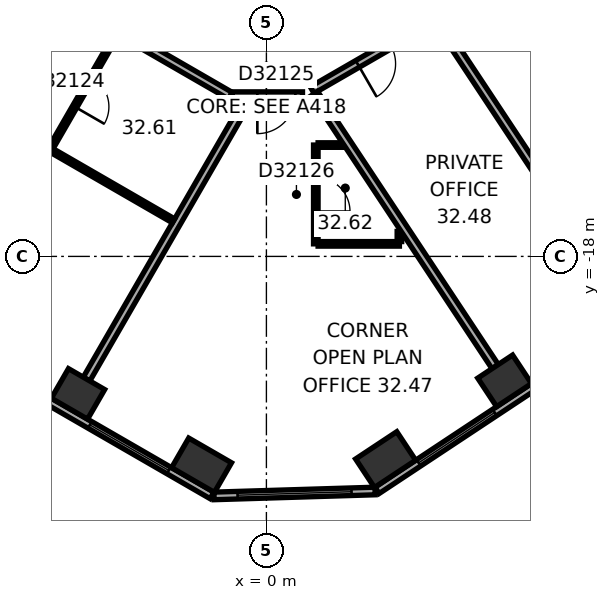
"""IFC4 building model, lengths in metres.
Left out: names, types, materials, properties, quantities, classifications, styles, units other than length and angle.
Written with IfcOpenShell. Run it as: python <this file> out.ifc"""

import sys

from ifc_helpers import new_model, si_unit, direction, frame, frame_2d, origin, origin_2d, place, context, subcontext, project, spatial, rectangle, extrude, element, fill, save


model = new_model("IFC4")
c1 = context("Model", 3, precision=1e-05, world=origin(), true_north=direction((0.0, 1.0)))
c2 = subcontext(c1, "Body", "Model", "MODEL_VIEW")
j1 = project(units=[si_unit("LENGTHUNIT", "METRE"), si_unit("PLANEANGLEUNIT", "RADIAN")], contexts=[c1])
p1 = place(None, origin())
s1 = spatial("IfcSite", under=j1, at=p1, CompositionType="ELEMENT")
p2 = place(p1, origin())
s2 = spatial("IfcBuilding", under=s1, at=p2, CompositionType="ELEMENT")
p3 = place(p2, frame((0.0, 0.0, 131.8)))
s3 = spatial("IfcBuildingStorey", under=s2, at=p3, CompositionType="ELEMENT", Elevation=131.8)
p4 = place(p3, frame((-4.958, -21.617, 0.0), z_axis=(0.0, 0.0, 1.0), x_axis=(0.866025403784, -0.5, 0.0)))
e1 = element("IfcColumn", 1, at=p4, inside=s3, PredefinedType="COLUMN", context=c2, shape_type="SweptSolid", body=[
    extrude(rectangle(XDim=1.1, YDim=0.9, at=origin_2d()), origin(), (0.0, 0.0, 1.0), 3.7),
])
for number, where, z_axis, x_axis in (
    (2, (-1.706, -23.494, 0.0), (0.0, 0.0, 1.0), (0.866, -0.5, 0.0)),
    (3, (3.137, -23.346, 0.0), (0.0, 0.0, 1.0), (0.834, 0.552, 0.0)),
):
    element("IfcColumn", number, at=place(p3, frame(where, z_axis=z_axis, x_axis=x_axis)), inside=s3, PredefinedType="COLUMN", context=c2, shape_type="SweptSolid", body=[
        extrude(rectangle(XDim=1.3, YDim=0.9, at=origin_2d()), origin(), (0.0, 0.0, 1.0), 3.7),
    ])
p5 = place(p3, frame((6.268, -21.274, 0.0), z_axis=(0.0, 0.0, 1.0), x_axis=(0.833885822067, 0.551936985312, 0.0)))
e4 = element("IfcColumn", 4, at=p5, inside=s3, PredefinedType="COLUMN", context=c2, shape_type="SweptSolid", body=[
    extrude(rectangle(XDim=1.1, YDim=0.9, at=origin_2d()), origin(), (0.0, 0.0, 1.0), 3.7),
])
p6 = place(p3, frame((-18.789, -14.267, 0.0), z_axis=(0.0, 0.0, 1.0), x_axis=(0.866023315909, -0.500003616288, 0.0)))
e5 = element("IfcWall", 5, at=p6, inside=s3, PredefinedType="STANDARD", context=c2, shape_type="SweptSolid", body=[
    extrude(rectangle(XDim=20.044, YDim=0.2, at=frame_2d((10.022, 0.0))), origin(), (0.0, 0.0, 1.0), 3.7),
])
p7 = place(p6, frame((1.314, 0.0, 0.9)))
e6 = element("IfcOpeningElement", 6, at=p7, cuts=e5, PredefinedType="OPENING", context=c2, shape_type="SweptSolid", body=[
    extrude(rectangle(XDim=2.4, YDim=2.0, at=frame_2d((1.2, 1.0))), frame((0.0, 0.11, 0.0), z_axis=(0.0, -1.0, 0.0), x_axis=(1.0, 0.0, 0.0)), (0.0, 0.0, 1.0), 0.22),
])
p8 = place(p6, frame((5.069, 0.0, 0.9)))
e7 = element("IfcOpeningElement", 7, at=p8, cuts=e5, PredefinedType="OPENING", context=c2, shape_type="SweptSolid", body=[
    extrude(rectangle(XDim=2.4, YDim=2.0, at=frame_2d((1.2, 1.0))), frame((0.0, 0.11, 0.0), z_axis=(0.0, -1.0, 0.0), x_axis=(1.0, 0.0, 0.0)), (0.0, 0.0, 1.0), 0.22),
])
p9 = place(p6, frame((8.823, 0.0, 0.9)))
e8 = element("IfcOpeningElement", 8, at=p9, cuts=e5, PredefinedType="OPENING", context=c2, shape_type="SweptSolid", body=[
    extrude(rectangle(XDim=2.4, YDim=2.0, at=frame_2d((1.2, 1.0))), frame((0.0, 0.11, 0.0), z_axis=(0.0, -1.0, 0.0), x_axis=(1.0, 0.0, 0.0)), (0.0, 0.0, 1.0), 0.22),
])
p10 = place(p6, frame((12.577, 0.0, 0.9)))
e9 = element("IfcOpeningElement", 9, at=p10, cuts=e5, PredefinedType="OPENING", context=c2, shape_type="SweptSolid", body=[
    extrude(rectangle(XDim=2.4, YDim=2.0, at=frame_2d((1.2, 1.0))), frame((0.0, 0.11, 0.0), z_axis=(0.0, -1.0, 0.0), x_axis=(1.0, 0.0, 0.0)), (0.0, 0.0, 1.0), 0.22),
])
p11 = place(p6, frame((16.331, 0.0, 0.9)))
e10 = element("IfcOpeningElement", 10, at=p11, cuts=e5, PredefinedType="OPENING", context=c2, shape_type="SweptSolid", body=[
    extrude(rectangle(XDim=2.4, YDim=2.0, at=frame_2d((1.2, 1.0))), frame((0.0, 0.11, 0.0), z_axis=(0.0, -1.0, 0.0), x_axis=(1.0, 0.0, 0.0)), (0.0, 0.0, 1.0), 0.22),
])
p12 = place(p3, frame((-1.378, -24.302, 0.0), z_axis=(0.0, 0.0, 1.0), x_axis=(0.999533857267, 0.030529791629, 0.0)))
e11 = element("IfcWall", 11, at=p12, inside=s3, PredefinedType="STANDARD", context=c2, shape_type="SweptSolid", body=[
    extrude(rectangle(XDim=4.238, YDim=0.2, at=frame_2d((2.119, 0.0))), origin(), (0.0, 0.0, 1.0), 3.7),
])
p13 = place(p12, frame((0.619, 0.0, 0.9)))
e12 = element("IfcOpeningElement", 12, at=p13, cuts=e11, PredefinedType="OPENING", context=c2, shape_type="SweptSolid", body=[
    extrude(rectangle(XDim=3.0, YDim=2.0, at=frame_2d((1.5, 1.0))), frame((0.0, 0.11, 0.0), z_axis=(0.0, -1.0, 0.0), x_axis=(1.0, 0.0, 0.0)), (0.0, 0.0, 1.0), 0.22),
])
p14 = place(p3, frame((2.911, -24.156, 0.0), z_axis=(0.0, 0.0, 1.0), x_axis=(0.833882163564, 0.551942512668, 0.0)))
e13 = element("IfcWall", 13, at=p14, inside=s3, PredefinedType="STANDARD", context=c2, shape_type="SweptSolid", body=[
    extrude(rectangle(XDim=20.044, YDim=0.2, at=frame_2d((10.022, 0.0))), origin(), (0.0, 0.0, 1.0), 3.7),
])
p15 = place(p14, frame((1.313, 0.0, 0.9)))
e14 = element("IfcOpeningElement", 14, at=p15, cuts=e13, PredefinedType="OPENING", context=c2, shape_type="SweptSolid", body=[
    extrude(rectangle(XDim=2.4, YDim=2.0, at=frame_2d((1.2, 1.0))), frame((0.0, 0.11, 0.0), z_axis=(0.0, -1.0, 0.0), x_axis=(1.0, 0.0, 0.0)), (0.0, 0.0, 1.0), 0.22),
])
p16 = place(p14, frame((5.067, 0.0, 0.9)))
e15 = element("IfcOpeningElement", 15, at=p16, cuts=e13, PredefinedType="OPENING", context=c2, shape_type="SweptSolid", body=[
    extrude(rectangle(XDim=2.4, YDim=2.0, at=frame_2d((1.2, 1.0))), frame((0.0, 0.11, 0.0), z_axis=(0.0, -1.0, 0.0), x_axis=(1.0, 0.0, 0.0)), (0.0, 0.0, 1.0), 0.22),
])
p17 = place(p14, frame((8.821, 0.0, 0.9)))
e16 = element("IfcOpeningElement", 16, at=p17, cuts=e13, PredefinedType="OPENING", context=c2, shape_type="SweptSolid", body=[
    extrude(rectangle(XDim=2.4, YDim=2.0, at=frame_2d((1.2, 1.0))), frame((0.0, 0.11, 0.0), z_axis=(0.0, -1.0, 0.0), x_axis=(1.0, 0.0, 0.0)), (0.0, 0.0, 1.0), 0.22),
])
p18 = place(p14, frame((12.575, 0.0, 0.9)))
e17 = element("IfcOpeningElement", 17, at=p18, cuts=e13, PredefinedType="OPENING", context=c2, shape_type="SweptSolid", body=[
    extrude(rectangle(XDim=2.4, YDim=2.0, at=frame_2d((1.2, 1.0))), frame((0.0, 0.11, 0.0), z_axis=(0.0, -1.0, 0.0), x_axis=(1.0, 0.0, 0.0)), (0.0, 0.0, 1.0), 0.22),
])
p19 = place(p14, frame((16.329, 0.0, 0.9)))
e18 = element("IfcOpeningElement", 18, at=p19, cuts=e13, PredefinedType="OPENING", context=c2, shape_type="SweptSolid", body=[
    extrude(rectangle(XDim=2.4, YDim=2.0, at=frame_2d((1.2, 1.0))), frame((0.0, 0.11, 0.0), z_axis=(0.0, -1.0, 0.0), x_axis=(1.0, 0.0, 0.0)), (0.0, 0.0, 1.0), 0.22),
])
p20 = place(p3, frame((-11.415, -7.728, 0.0), z_axis=(0.0, 0.0, 1.0), x_axis=(0.866022749921, -0.500004596598, 0.0)))
e19 = element("IfcWall", 19, at=p20, inside=s3, PredefinedType="PARTITIONING", context=c2, shape_type="SweptSolid", body=[
    extrude(rectangle(XDim=12.084, YDim=0.2, at=frame_2d((6.042, 0.0))), origin(), (0.0, 0.0, 1.0), 3.42),
])
p21 = place(p20, frame((5.58, 0.0, 0.0)))
e20 = element("IfcOpeningElement", 20, at=p21, cuts=e19, PredefinedType="OPENING", context=c2, shape_type="SweptSolid", body=[
    extrude(rectangle(XDim=1.0, YDim=2.1, at=frame_2d((0.5, 1.05))), frame((0.0, 0.11, 0.0), z_axis=(0.0, -1.0, 0.0), x_axis=(1.0, 0.0, 0.0)), (0.0, 0.0, 1.0), 0.22),
])
p22 = place(p3, frame((-5.695, -15.188, 0.0), z_axis=(0.0, 0.0, 1.0), x_axis=(0.500010275428, 0.866019471182, 0.0)))
e21 = element("IfcWall", 21, at=p22, inside=s3, PredefinedType="PARTITIONING", context=c2, shape_type="SweptSolid", body=[
    extrude(rectangle(XDim=3.5, YDim=0.12, at=frame_2d((1.75, 0.0))), origin(), (0.0, 0.0, 1.0), 3.42),
])
p23 = place(p22, frame((1.3, 0.0, 0.0)))
e22 = element("IfcOpeningElement", 22, at=p23, cuts=e21, PredefinedType="OPENING", context=c2, shape_type="SweptSolid", body=[
    extrude(rectangle(XDim=0.9, YDim=2.1, at=frame_2d((0.45, 1.05))), frame((0.0, 0.07, 0.0), z_axis=(0.0, -1.0, 0.0), x_axis=(1.0, 0.0, 0.0)), (0.0, 0.0, 1.0), 0.14),
])
p24 = place(p3, frame((-4.732, -21.228, 0.0), z_axis=(0.0, 0.0, 1.0), x_axis=(0.500000843414, 0.866024916838, 0.0)))
e23 = element("IfcWall", 23, at=p24, inside=s3, PredefinedType="PARTITIONING", context=c2, shape_type="SweptSolid", body=[
    extrude(rectangle(XDim=8.452, YDim=0.2, at=frame_2d((4.226, 0.0))), origin(), (0.0, 0.0, 1.0), 3.42),
])
p25 = place(p3, frame((-2.444, -17.064, 0.0), z_axis=(0.0, 0.0, 1.0), x_axis=(-0.86602156466, 0.500006649499, 0.0)))
e24 = element("IfcWall", 24, at=p25, inside=s3, PredefinedType="PARTITIONING", context=c2, shape_type="SweptSolid", body=[
    extrude(rectangle(XDim=3.693, YDim=0.12, at=frame_2d((1.847, 0.0))), origin(), (0.0, 0.0, 1.0), 3.42),
])
p26 = place(p3, frame((-0.91, -13.77, 0.0), z_axis=(0.0, 0.0, 1.0), x_axis=(1.0, 0.0, 0.0)))
e25 = element("IfcWall", 25, at=p26, inside=s3, PredefinedType="PARTITIONING", context=c2, shape_type="SweptSolid", body=[
    extrude(rectangle(XDim=1.86, YDim=0.2, at=frame_2d((0.93, 0.0))), origin(), (0.0, 0.0, 1.0), 3.42),
])
p27 = place(p26, frame((0.672, 0.0, 0.0)))
e26 = element("IfcOpeningElement", 26, at=p27, cuts=e25, PredefinedType="OPENING", context=c2, shape_type="SweptSolid", body=[
    extrude(rectangle(XDim=1.0, YDim=2.1, at=frame_2d((0.5, 1.05))), frame((0.0, 0.11, 0.0), z_axis=(0.0, -1.0, 0.0), x_axis=(1.0, 0.0, 0.0)), (0.0, 0.0, 1.0), 0.22),
])
p28 = place(p3, frame((1.204, -13.623, 0.0), z_axis=(0.0, 0.0, 1.0), x_axis=(0.866031867142, 0.49998880497, 0.0)))
e27 = element("IfcWall", 27, at=p28, inside=s3, PredefinedType="PARTITIONING", context=c2, shape_type="SweptSolid", body=[
    extrude(rectangle(XDim=6.268, YDim=0.2, at=frame_2d((3.134, 0.0))), origin(), (0.0, 0.0, 1.0), 3.42),
])
p29 = place(p28, frame((1.381, 0.0, 0.0)))
e28 = element("IfcOpeningElement", 28, at=p29, cuts=e27, PredefinedType="OPENING", context=c2, shape_type="SweptSolid", body=[
    extrude(rectangle(XDim=1.0, YDim=2.1, at=frame_2d((0.5, 1.05))), frame((0.0, 0.11, 0.0), z_axis=(0.0, -1.0, 0.0), x_axis=(1.0, 0.0, 0.0)), (0.0, 0.0, 1.0), 0.22),
])
p30 = place(p28, frame((4.515, 0.0, 0.0)))
e29 = element("IfcOpeningElement", 29, at=p30, cuts=e27, PredefinedType="OPENING", context=c2, shape_type="SweptSolid", body=[
    extrude(rectangle(XDim=1.0, YDim=2.1, at=frame_2d((0.5, 1.05))), frame((0.0, 0.11, 0.0), z_axis=(0.0, -1.0, 0.0), x_axis=(1.0, 0.0, 0.0)), (0.0, 0.0, 1.0), 0.22),
])
p31 = place(p3, frame((1.3, -17.67, 0.0), z_axis=(0.0, 0.0, 1.0), x_axis=(0.0, 1.0, 0.0)))
e30 = element("IfcWall", 30, at=p31, inside=s3, PredefinedType="PARTITIONING", context=c2, shape_type="SweptSolid", body=[
    extrude(rectangle(XDim=2.6, YDim=0.12, at=frame_2d((1.3, 0.0))), origin(), (0.0, 0.0, 1.0), 3.42),
])
p32 = place(p31, frame((0.85, 0.0, 0.0)))
e31 = element("IfcOpeningElement", 31, at=p32, cuts=e30, PredefinedType="OPENING", context=c2, shape_type="SweptSolid", body=[
    extrude(rectangle(XDim=0.9, YDim=2.1, at=frame_2d((0.45, 1.05))), frame((0.0, 0.07, 0.0), z_axis=(0.0, -1.0, 0.0), x_axis=(1.0, 0.0, 0.0)), (0.0, 0.0, 1.0), 0.14),
])
p33 = place(p3, frame((1.36, -15.07, 0.0), z_axis=(0.0, 0.0, 1.0), x_axis=(1.0, 0.0, 0.0)))
e32 = element("IfcWall", 32, at=p33, inside=s3, PredefinedType="PARTITIONING", context=c2, shape_type="SweptSolid", body=[
    extrude(rectangle(XDim=0.651, YDim=0.12, at=frame_2d((0.325, 0.0))), origin(), (0.0, 0.0, 1.0), 3.42),
])
p34 = place(p3, frame((3.5, -17.67, 0.0), z_axis=(0.0, 0.0, 1.0), x_axis=(-1.0, 0.0, 0.0)))
e33 = element("IfcWall", 33, at=p34, inside=s3, PredefinedType="PARTITIONING", context=c2, shape_type="SweptSolid", body=[
    extrude(rectangle(XDim=2.14, YDim=0.12, at=frame_2d((1.07, 0.0))), origin(), (0.0, 0.0, 1.0), 3.42),
])
p35 = place(p3, frame((3.5, -17.343, 0.0), z_axis=(0.0, 0.0, 1.0), x_axis=(0.0, -1.0, 0.0)))
e34 = element("IfcWall", 34, at=p35, inside=s3, PredefinedType="PARTITIONING", context=c2, shape_type="SweptSolid", body=[
    extrude(rectangle(XDim=0.267, YDim=0.12, at=frame_2d((0.134, 0.0))), origin(), (0.0, 0.0, 1.0), 3.42),
])
p36 = place(p3, frame((6.02, -20.899, 0.0), z_axis=(0.0, 0.0, 1.0), x_axis=(-0.551943990108, 0.833881185651, 0.0)))
e35 = element("IfcWall", 35, at=p36, inside=s3, PredefinedType="PARTITIONING", context=c2, shape_type="SweptSolid", body=[
    extrude(rectangle(XDim=8.615, YDim=0.2, at=frame_2d((4.308, 0.0))), origin(), (0.0, 0.0, 1.0), 3.42),
])
p37 = place(p3, frame((9.15, -18.827, 0.0), z_axis=(0.0, 0.0, 1.0), x_axis=(-0.551942527453, 0.833882153777, 0.0)))
e36 = element("IfcWall", 36, at=p37, inside=s3, PredefinedType="PARTITIONING", context=c2, shape_type="SweptSolid", body=[
    extrude(rectangle(XDim=8.386, YDim=0.2, at=frame_2d((4.193, 0.0))), origin(), (0.0, 0.0, 1.0), 2.87),
])
p38 = place(p11, origin())
e37 = element("IfcWindow", 37, at=p38, inside=s3, PartitioningType="SINGLE_PANEL", PredefinedType="WINDOW", context=c2, shape_type="SweptSolid", body=[
    extrude(rectangle(XDim=2.4, YDim=2.0, at=frame_2d((1.2, 1.0))), frame((0.0, 0.03, 0.0), z_axis=(0.0, -1.0, 0.0), x_axis=(1.0, 0.0, 0.0)), (0.0, 0.0, 1.0), 0.06),
])
fill(e10, e37)
p39 = place(p13, origin())
e38 = element("IfcWindow", 38, at=p39, inside=s3, PartitioningType="SINGLE_PANEL", PredefinedType="WINDOW", context=c2, shape_type="SweptSolid", body=[
    extrude(rectangle(XDim=3.0, YDim=2.0, at=frame_2d((1.5, 1.0))), frame((0.0, 0.03, 0.0), z_axis=(0.0, -1.0, 0.0), x_axis=(1.0, 0.0, 0.0)), (0.0, 0.0, 1.0), 0.06),
])
fill(e12, e38)
p40 = place(p15, origin())
e39 = element("IfcWindow", 39, at=p40, inside=s3, PartitioningType="SINGLE_PANEL", PredefinedType="WINDOW", context=c2, shape_type="SweptSolid", body=[
    extrude(rectangle(XDim=2.4, YDim=2.0, at=frame_2d((1.2, 1.0))), frame((0.0, 0.03, 0.0), z_axis=(0.0, -1.0, 0.0), x_axis=(1.0, 0.0, 0.0)), (0.0, 0.0, 1.0), 0.06),
])
fill(e14, e39)
p41 = place(p23, origin())
e40 = element("IfcDoor", 40, at=p41, inside=s3, OperationType="SINGLE_SWING_LEFT", PredefinedType="DOOR", context=c2, shape_type="SweptSolid", body=[
    extrude(rectangle(XDim=0.9, YDim=2.1, at=frame_2d((0.45, 1.05))), frame((0.0, 0.025, 0.0), z_axis=(0.0, -1.0, 0.0), x_axis=(1.0, 0.0, 0.0)), (0.0, 0.0, 1.0), 0.05),
])
fill(e22, e40)
p42 = place(p27, origin())
e41 = element("IfcDoor", 41, at=p42, inside=s3, OperationType="SINGLE_SWING_LEFT", PredefinedType="DOOR", context=c2, shape_type="SweptSolid", body=[
    extrude(rectangle(XDim=1.0, YDim=2.1, at=frame_2d((0.5, 1.05))), frame((0.0, 0.025, 0.0), z_axis=(0.0, -1.0, 0.0), x_axis=(1.0, 0.0, 0.0)), (0.0, 0.0, 1.0), 0.05),
])
fill(e26, e41)
p43 = place(p32, origin())
e42 = element("IfcDoor", 42, at=p43, inside=s3, OperationType="SINGLE_SWING_LEFT", PredefinedType="DOOR", context=c2, shape_type="SweptSolid", body=[
    extrude(rectangle(XDim=0.9, YDim=2.1, at=frame_2d((0.45, 1.05))), frame((0.0, 0.025, 0.0), z_axis=(0.0, -1.0, 0.0), x_axis=(1.0, 0.0, 0.0)), (0.0, 0.0, 1.0), 0.05),
])
fill(e31, e42)
p44 = place(p29, origin())
e43 = element("IfcDoor", 43, at=p44, inside=s3, OperationType="SINGLE_SWING_LEFT", PredefinedType="DOOR", context=c2, shape_type="SweptSolid", body=[
    extrude(rectangle(XDim=1.0, YDim=2.1, at=frame_2d((0.5, 1.05))), frame((0.0, 0.025, 0.0), z_axis=(0.0, -1.0, 0.0), x_axis=(1.0, 0.0, 0.0)), (0.0, 0.0, 1.0), 0.05),
])
fill(e28, e43)
save(model, sys.argv[1])
